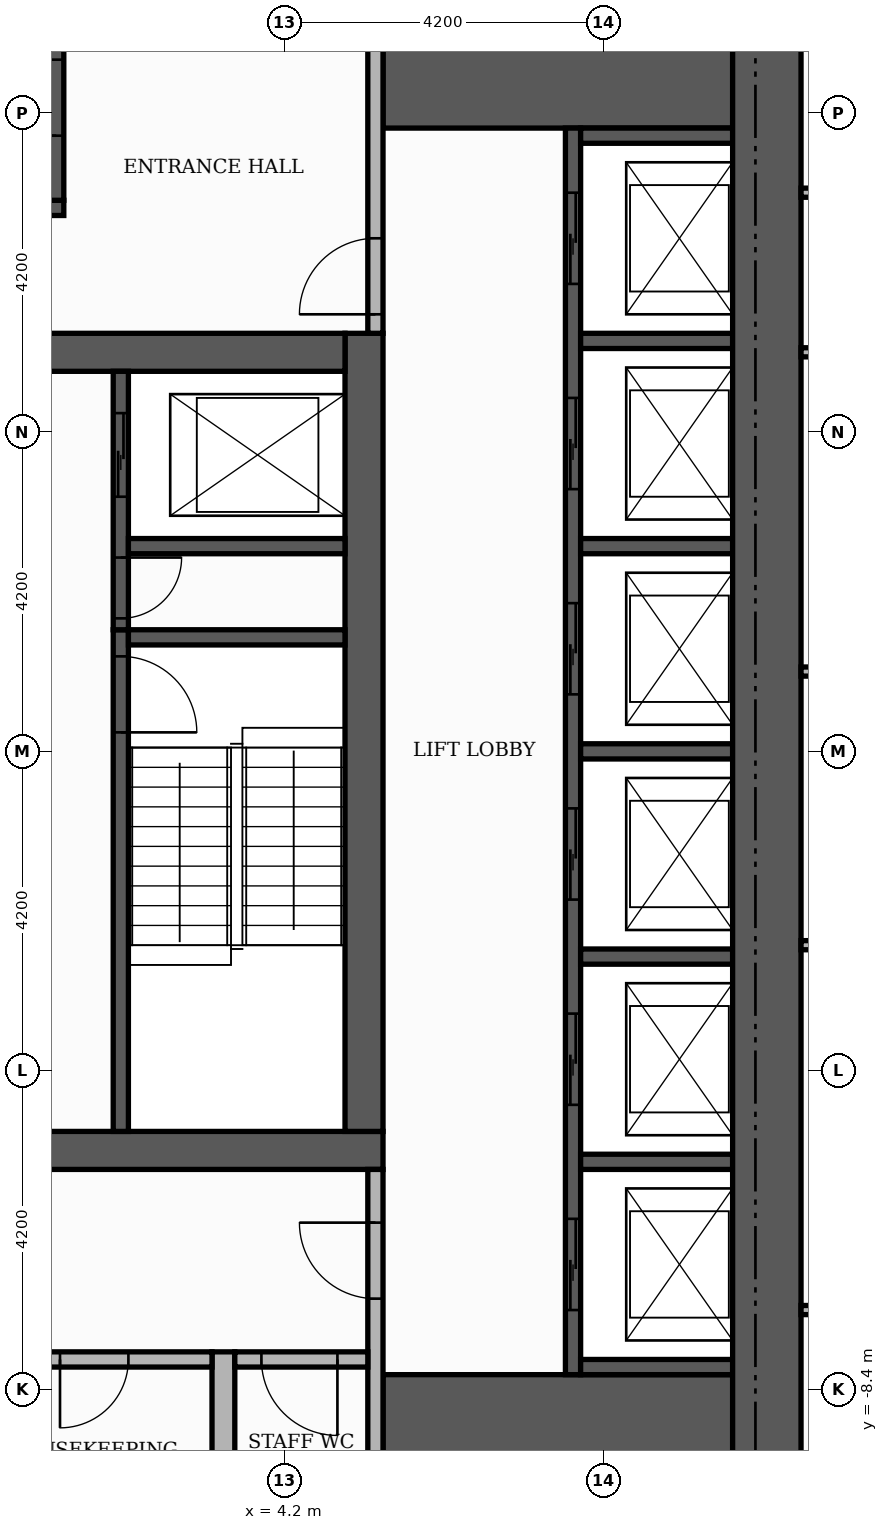
"""IFC4 building model, lengths in metres.
Left out: names, types, materials, properties, quantities, classifications, styles, units other than length and angle.
Written with IfcOpenShell. Run it as: python <this file> out.ifc"""

import sys

from ifc_helpers import new_model, si_unit, direction, frame, frame_2d, origin, place, context, subcontext, project, spatial, rectangle, extrude, element, fill, save


model = new_model("IFC4")
c1 = context("Model", 3, precision=1e-05, world=origin(), true_north=direction((0.0, 1.0)))
c2 = subcontext(c1, "Body", "Model", "MODEL_VIEW")
j1 = project(units=[si_unit("LENGTHUNIT", "METRE"), si_unit("PLANEANGLEUNIT", "RADIAN")], contexts=[c1])
p1 = place(None, origin())
s1 = spatial("IfcSite", under=j1, at=p1, CompositionType="ELEMENT")
p2 = place(p1, origin())
s2 = spatial("IfcBuilding", under=s1, at=p2, CompositionType="ELEMENT")
p3 = place(p2, frame((0.0, 0.0, 264.0)))
s3 = spatial("IfcBuildingStorey", under=s2, at=p3, CompositionType="ELEMENT", Elevation=264.0)
p4 = place(p3, frame((-5.5, -5.25, 0.0), z_axis=(0.0, 0.0, 1.0), x_axis=(1.0, 0.0, 0.0)))
e1 = element("IfcWall", 1, at=p4, inside=s3, PredefinedType="SHEAR", context=c2, shape_type="SweptSolid", body=[
    extrude(rectangle(XDim=11.0, YDim=0.5, at=frame_2d((5.5, 0.0))), origin(), (0.0, 0.0, 1.0), 3.48),
])
p5 = place(p4, frame((4.9, 0.0, 0.0)))
e2 = element("IfcOpeningElement", 2, at=p5, cuts=e1, PredefinedType="OPENING", context=c2, shape_type="SweptSolid", body=[
    extrude(rectangle(XDim=1.2, YDim=2.1, at=frame_2d((0.6, 1.05))), frame((0.0, 0.26, 0.0), z_axis=(0.0, -1.0, 0.0), x_axis=(1.0, 0.0, 0.0)), (0.0, 0.0, 1.0), 0.52),
])
p6 = place(p3, frame((5.25, -5.0, 0.0), z_axis=(0.0, 0.0, 1.0), x_axis=(0.0, 1.0, 0.0)))
e3 = element("IfcWall", 3, at=p6, inside=s3, PredefinedType="SHEAR", context=c2, shape_type="SweptSolid", body=[
    extrude(rectangle(XDim=10.5, YDim=0.5, at=frame_2d((5.25, 0.0))), origin(), (0.0, 0.0, 1.0), 3.48),
])
p7 = place(p3, frame((-5.0, 5.25, 0.0), z_axis=(0.0, 0.0, 1.0), x_axis=(1.0, 0.0, 0.0)))
e4 = element("IfcWall", 4, at=p7, inside=s3, PredefinedType="SHEAR", context=c2, shape_type="SweptSolid", body=[
    extrude(rectangle(XDim=10.0, YDim=0.5, at=frame_2d((5.0, 0.0))), origin(), (0.0, 0.0, 1.0), 3.48),
])
p8 = place(p7, frame((4.4, 0.0, 0.0)))
e5 = element("IfcOpeningElement", 5, at=p8, cuts=e4, PredefinedType="OPENING", context=c2, shape_type="SweptSolid", body=[
    extrude(rectangle(XDim=1.2, YDim=2.1, at=frame_2d((0.6, 1.05))), frame((0.0, 0.26, 0.0), z_axis=(0.0, -1.0, 0.0), x_axis=(1.0, 0.0, 0.0)), (0.0, 0.0, 1.0), 0.52),
])
for number, where, z_axis, x_axis in (
    (6, (5.5, -9.15, 0.0), (0.0, 0.0, 1.0), (1.0, 0.0, 0.0)),
    (7, (5.5, 9.15, 0.0), (0.0, 0.0, 1.0), (1.0, 0.0, 0.0)),
):
    element("IfcWall", number, at=place(p3, frame(where, z_axis=z_axis, x_axis=x_axis)), inside=s3, PredefinedType="SHEAR", context=c2, shape_type="SweptSolid", body=[
        extrude(rectangle(XDim=4.6, YDim=1.9, at=frame_2d((2.3, 0.0))), origin(), (0.0, 0.0, 1.0), 3.48),
    ])
p9 = place(p3, frame((2.05, -5.0, 0.0), z_axis=(0.0, 0.0, 1.0), x_axis=(0.0, 1.0, 0.0)))
e8 = element("IfcWall", 8, at=p9, inside=s3, PredefinedType="SHEAR", context=c2, shape_type="SweptSolid", body=[
    extrude(rectangle(XDim=6.6, YDim=0.2, at=frame_2d((3.3, 0.0))), origin(), (0.0, 0.0, 1.0), 3.48),
])
p10 = place(p9, frame((5.25, 0.0, 0.0)))
e9 = element("IfcOpeningElement", 9, at=p10, cuts=e8, PredefinedType="OPENING", context=c2, shape_type="SweptSolid", body=[
    extrude(rectangle(XDim=1.0, YDim=2.1, at=frame_2d((0.5, 1.05))), frame((0.0, 0.11, 0.0), z_axis=(0.0, -1.0, 0.0), x_axis=(1.0, 0.0, 0.0)), (0.0, 0.0, 1.0), 0.22),
])
p11 = place(p3, frame((2.15, 1.5, 0.0), z_axis=(0.0, 0.0, 1.0), x_axis=(1.0, 0.0, 0.0)))
e10 = element("IfcWall", 10, at=p11, inside=s3, PredefinedType="SHEAR", context=c2, shape_type="SweptSolid", body=[
    extrude(rectangle(XDim=2.85, YDim=0.2, at=frame_2d((1.425, 0.0))), origin(), (0.0, 0.0, 1.0), 3.48),
])
p12 = place(p3, frame((-5.5, 7.15, 0.0), z_axis=(0.0, 0.0, 1.0), x_axis=(1.0, 0.0, 0.0)))
e11 = element("IfcWall", 11, at=p12, inside=s3, PredefinedType="SHEAR", context=c2, shape_type="SweptSolid", body=[
    extrude(rectangle(XDim=6.8, YDim=0.2, at=frame_2d((3.4, 0.0))), origin(), (0.0, 0.0, 1.0), 3.48),
])
p13 = place(p3, frame((1.2, 7.25, 0.0), z_axis=(0.0, 0.0, 1.0), x_axis=(0.0, 1.0, 0.0)))
e12 = element("IfcWall", 12, at=p13, inside=s3, PredefinedType="SHEAR", context=c2, shape_type="SweptSolid", body=[
    extrude(rectangle(XDim=2.85, YDim=0.2, at=frame_2d((1.425, 0.0))), origin(), (0.0, 0.0, 1.0), 3.48),
])
p14 = place(p13, frame((0.85, 0.0, 0.0)))
e13 = element("IfcOpeningElement", 13, at=p14, cuts=e12, PredefinedType="OPENING", context=c2, shape_type="SweptSolid", body=[
    extrude(rectangle(XDim=1.0, YDim=2.1, at=frame_2d((0.5, 1.05))), frame((0.0, 0.11, 0.0), z_axis=(0.0, -1.0, 0.0), x_axis=(1.0, 0.0, 0.0)), (0.0, 0.0, 1.0), 0.22),
])
p15 = place(p3, frame((8.0, -8.2, 0.0), z_axis=(0.0, 0.0, 1.0), x_axis=(0.0, 1.0, 0.0)))
e14 = element("IfcWall", 14, at=p15, inside=s3, PredefinedType="SHEAR", context=c2, shape_type="SweptSolid", body=[
    extrude(rectangle(XDim=16.4, YDim=0.2, at=frame_2d((8.2, 0.0))), origin(), (0.0, 0.0, 1.0), 3.48),
])
p16 = place(p15, frame((0.85, 0.0, 0.0)))
e15 = element("IfcOpeningElement", 15, at=p16, cuts=e14, PredefinedType="OPENING", context=c2, shape_type="SweptSolid", body=[
    extrude(rectangle(XDim=1.2, YDim=2.1, at=frame_2d((0.6, 1.05))), frame((0.0, 0.11, 0.0), z_axis=(0.0, -1.0, 0.0), x_axis=(1.0, 0.0, 0.0)), (0.0, 0.0, 1.0), 0.22),
])
p17 = place(p15, frame((3.55, 0.0, 0.0)))
e16 = element("IfcOpeningElement", 16, at=p17, cuts=e14, PredefinedType="OPENING", context=c2, shape_type="SweptSolid", body=[
    extrude(rectangle(XDim=1.2, YDim=2.1, at=frame_2d((0.6, 1.05))), frame((0.0, 0.11, 0.0), z_axis=(0.0, -1.0, 0.0), x_axis=(1.0, 0.0, 0.0)), (0.0, 0.0, 1.0), 0.22),
])
p18 = place(p15, frame((6.25, 0.0, 0.0)))
e17 = element("IfcOpeningElement", 17, at=p18, cuts=e14, PredefinedType="OPENING", context=c2, shape_type="SweptSolid", body=[
    extrude(rectangle(XDim=1.2, YDim=2.1, at=frame_2d((0.6, 1.05))), frame((0.0, 0.11, 0.0), z_axis=(0.0, -1.0, 0.0), x_axis=(1.0, 0.0, 0.0)), (0.0, 0.0, 1.0), 0.22),
])
p19 = place(p15, frame((8.95, 0.0, 0.0)))
e18 = element("IfcOpeningElement", 18, at=p19, cuts=e14, PredefinedType="OPENING", context=c2, shape_type="SweptSolid", body=[
    extrude(rectangle(XDim=1.2, YDim=2.1, at=frame_2d((0.6, 1.05))), frame((0.0, 0.11, 0.0), z_axis=(0.0, -1.0, 0.0), x_axis=(1.0, 0.0, 0.0)), (0.0, 0.0, 1.0), 0.22),
])
p20 = place(p15, frame((11.65, 0.0, 0.0)))
e19 = element("IfcOpeningElement", 19, at=p20, cuts=e14, PredefinedType="OPENING", context=c2, shape_type="SweptSolid", body=[
    extrude(rectangle(XDim=1.2, YDim=2.1, at=frame_2d((0.6, 1.05))), frame((0.0, 0.11, 0.0), z_axis=(0.0, -1.0, 0.0), x_axis=(1.0, 0.0, 0.0)), (0.0, 0.0, 1.0), 0.22),
])
p21 = place(p15, frame((14.35, 0.0, 0.0)))
e20 = element("IfcOpeningElement", 20, at=p21, cuts=e14, PredefinedType="OPENING", context=c2, shape_type="SweptSolid", body=[
    extrude(rectangle(XDim=1.2, YDim=2.1, at=frame_2d((0.6, 1.05))), frame((0.0, 0.11, 0.0), z_axis=(0.0, -1.0, 0.0), x_axis=(1.0, 0.0, 0.0)), (0.0, 0.0, 1.0), 0.22),
])
for number, where, z_axis, x_axis in (
    (21, (8.1, -8.1, 0.0), (0.0, 0.0, 1.0), (1.0, 0.0, 0.0)),
    (22, (8.1, -5.4, 0.0), (0.0, 0.0, 1.0), (1.0, 0.0, 0.0)),
    (23, (8.1, -2.7, 0.0), (0.0, 0.0, 1.0), (1.0, 0.0, 0.0)),
    (24, (8.1, 0.0, 0.0), (0.0, 0.0, 1.0), (1.0, 0.0, 0.0)),
):
    element("IfcWall", number, at=place(p3, frame(where, z_axis=z_axis, x_axis=x_axis)), inside=s3, PredefinedType="SHEAR", context=c2, shape_type="SweptSolid", body=[
        extrude(rectangle(XDim=2.0, YDim=0.2, at=frame_2d((1.0, 0.0))), origin(), (0.0, 0.0, 1.0), 3.48),
    ])
p22 = place(p3, frame((2.05, 1.6, 0.0), z_axis=(0.0, 0.0, 1.0), x_axis=(0.0, 1.0, 0.0)))
e25 = element("IfcWall", 25, at=p22, inside=s3, PredefinedType="SHEAR", context=c2, shape_type="SweptSolid", body=[
    extrude(rectangle(XDim=3.4, YDim=0.2, at=frame_2d((1.7, 0.0))), origin(), (0.0, 0.0, 1.0), 3.48),
])
p23 = place(p22, frame((1.75, 0.0, 0.0)))
e26 = element("IfcOpeningElement", 26, at=p23, cuts=e25, PredefinedType="OPENING", context=c2, shape_type="SweptSolid", body=[
    extrude(rectangle(XDim=1.1, YDim=2.1, at=frame_2d((0.55, 1.05))), frame((0.0, 0.11, 0.0), z_axis=(0.0, -1.0, 0.0), x_axis=(1.0, 0.0, 0.0)), (0.0, 0.0, 1.0), 0.22),
])
p24 = place(p22, frame((0.15, 0.0, 0.0)))
e27 = element("IfcOpeningElement", 27, at=p24, cuts=e25, PredefinedType="OPENING", context=c2, shape_type="SweptSolid", body=[
    extrude(rectangle(XDim=0.8, YDim=2.1, at=frame_2d((0.4, 1.05))), frame((0.0, 0.11, 0.0), z_axis=(0.0, -1.0, 0.0), x_axis=(1.0, 0.0, 0.0)), (0.0, 0.0, 1.0), 0.22),
])
p25 = place(p3, frame((2.15, 2.7, 0.0), z_axis=(0.0, 0.0, 1.0), x_axis=(1.0, 0.0, 0.0)))
e28 = element("IfcWall", 28, at=p25, inside=s3, PredefinedType="SHEAR", context=c2, shape_type="SweptSolid", body=[
    extrude(rectangle(XDim=2.85, YDim=0.2, at=frame_2d((1.425, 0.0))), origin(), (0.0, 0.0, 1.0), 3.48),
])
for number, where, z_axis, x_axis in (
    (29, (8.1, 2.7, 0.0), (0.0, 0.0, 1.0), (1.0, 0.0, 0.0)),
    (30, (8.1, 5.4, 0.0), (0.0, 0.0, 1.0), (1.0, 0.0, 0.0)),
    (31, (8.1, 8.1, 0.0), (0.0, 0.0, 1.0), (1.0, 0.0, 0.0)),
):
    element("IfcWall", number, at=place(p3, frame(where, z_axis=z_axis, x_axis=x_axis)), inside=s3, PredefinedType="SHEAR", context=c2, shape_type="SweptSolid", body=[
        extrude(rectangle(XDim=2.0, YDim=0.2, at=frame_2d((1.0, 0.0))), origin(), (0.0, 0.0, 1.0), 3.48),
    ])
p26 = place(p3, frame((10.55, -10.1, 0.0), z_axis=(0.0, 0.0, 1.0), x_axis=(0.0, 1.0, 0.0)))
e32 = element("IfcWall", 32, at=p26, inside=s3, PredefinedType="SHEAR", context=c2, shape_type="SweptSolid", body=[
    extrude(rectangle(XDim=20.2, YDim=0.9, at=frame_2d((10.1, 0.0))), origin(), (0.0, 0.0, 1.0), 3.48),
])
p27 = place(p3, frame((3.4, -10.1, 0.0), z_axis=(0.0, 0.0, 1.0), x_axis=(0.0, 1.0, 0.0)))
e33 = element("IfcWall", 33, at=p27, inside=s3, PredefinedType="PARTITIONING", context=c2, shape_type="SweptSolid", body=[
    extrude(rectangle(XDim=2.2, YDim=0.3, at=frame_2d((1.1, 0.0))), origin(), (0.0, 0.0, 1.0), 3.48),
])
p28 = place(p3, frame((5.4, -10.1, 0.0), z_axis=(0.0, 0.0, 1.0), x_axis=(0.0, 1.0, 0.0)))
e34 = element("IfcWall", 34, at=p28, inside=s3, PredefinedType="PARTITIONING", context=c2, shape_type="SweptSolid", body=[
    extrude(rectangle(XDim=4.6, YDim=0.2, at=frame_2d((2.3, 0.0))), origin(), (0.0, 0.0, 1.0), 3.48),
])
p29 = place(p28, frame((2.9, 0.0, 0.0)))
e35 = element("IfcOpeningElement", 35, at=p29, cuts=e34, PredefinedType="OPENING", context=c2, shape_type="SweptSolid", body=[
    extrude(rectangle(XDim=1.0, YDim=2.1, at=frame_2d((0.5, 1.05))), frame((0.0, 0.11, 0.0), z_axis=(0.0, -1.0, 0.0), x_axis=(1.0, 0.0, 0.0)), (0.0, 0.0, 1.0), 0.22),
])
p30 = place(p3, frame((0.1, -8.0, 0.0), z_axis=(0.0, 0.0, 1.0), x_axis=(1.0, 0.0, 0.0)))
e36 = element("IfcWall", 36, at=p30, inside=s3, PredefinedType="PARTITIONING", context=c2, shape_type="SweptSolid", body=[
    extrude(rectangle(XDim=3.15, YDim=0.2, at=frame_2d((1.575, 0.0))), origin(), (0.0, 0.0, 1.0), 3.48),
])
p31 = place(p30, frame((1.15, 0.0, 0.0)))
e37 = element("IfcOpeningElement", 37, at=p31, cuts=e36, PredefinedType="OPENING", context=c2, shape_type="SweptSolid", body=[
    extrude(rectangle(XDim=0.9, YDim=2.1, at=frame_2d((0.45, 1.05))), frame((0.0, 0.11, 0.0), z_axis=(0.0, -1.0, 0.0), x_axis=(1.0, 0.0, 0.0)), (0.0, 0.0, 1.0), 0.22),
])
p32 = place(p3, frame((3.55, -8.0, 0.0), z_axis=(0.0, 0.0, 1.0), x_axis=(1.0, 0.0, 0.0)))
e38 = element("IfcWall", 38, at=p32, inside=s3, PredefinedType="PARTITIONING", context=c2, shape_type="SweptSolid", body=[
    extrude(rectangle(XDim=1.75, YDim=0.2, at=frame_2d((0.875, 0.0))), origin(), (0.0, 0.0, 1.0), 3.48),
])
p33 = place(p32, frame((0.35, 0.0, 0.0)))
e39 = element("IfcOpeningElement", 39, at=p33, cuts=e38, PredefinedType="OPENING", context=c2, shape_type="SweptSolid", body=[
    extrude(rectangle(XDim=1.0, YDim=2.1, at=frame_2d((0.5, 1.05))), frame((0.0, 0.11, 0.0), z_axis=(0.0, -1.0, 0.0), x_axis=(1.0, 0.0, 0.0)), (0.0, 0.0, 1.0), 0.22),
])
p34 = place(p3, frame((5.4, 5.5, 0.0), z_axis=(0.0, 0.0, 1.0), x_axis=(0.0, 1.0, 0.0)))
e40 = element("IfcWall", 40, at=p34, inside=s3, PredefinedType="PARTITIONING", context=c2, shape_type="SweptSolid", body=[
    extrude(rectangle(XDim=4.6, YDim=0.2, at=frame_2d((2.3, 0.0))), origin(), (0.0, 0.0, 1.0), 3.48),
])
p35 = place(p34, frame((0.25, 0.0, 0.0)))
e41 = element("IfcOpeningElement", 41, at=p35, cuts=e40, PredefinedType="OPENING", context=c2, shape_type="SweptSolid", body=[
    extrude(rectangle(XDim=1.0, YDim=2.1, at=frame_2d((0.5, 1.05))), frame((0.0, 0.11, 0.0), z_axis=(0.0, -1.0, 0.0), x_axis=(1.0, 0.0, 0.0)), (0.0, 0.0, 1.0), 0.22),
])
p36 = place(p3, frame((11.0, -7.35, 0.0), z_axis=(0.0, 0.0, 1.0), x_axis=(1.0, 0.0, 0.0)))
e42 = element("IfcWall", 42, at=p36, inside=s3, PredefinedType="PARTITIONING", context=c2, shape_type="SweptSolid", body=[
    extrude(rectangle(XDim=7.32, YDim=0.12, at=frame_2d((3.66, 0.0))), origin(), (0.0, 0.0, 1.0), 3.48),
])
p37 = place(p36, frame((3.21, 0.0, 0.0)))
e43 = element("IfcOpeningElement", 43, at=p37, cuts=e42, PredefinedType="OPENING", context=c2, shape_type="SweptSolid", body=[
    extrude(rectangle(XDim=0.9, YDim=2.1, at=frame_2d((0.45, 1.05))), frame((0.0, 0.07, 0.0), z_axis=(0.0, -1.0, 0.0), x_axis=(1.0, 0.0, 0.0)), (0.0, 0.0, 1.0), 0.14),
])
for number, where, z_axis, x_axis in (
    (44, (11.0, -2.55, 0.0), (0.0, 0.0, 1.0), (1.0, 0.0, 0.0)),
    (45, (11.0, 1.05, 0.0), (0.0, 0.0, 1.0), (1.0, 0.0, 0.0)),
    (46, (11.0, 5.25, 0.0), (0.0, 0.0, 1.0), (1.0, 0.0, 0.0)),
    (47, (11.0, 7.35, 0.0), (0.0, 0.0, 1.0), (1.0, 0.0, 0.0)),
):
    element("IfcWall", number, at=place(p3, frame(where, z_axis=z_axis, x_axis=x_axis)), inside=s3, PredefinedType="PARTITIONING", context=c2, shape_type="SweptSolid", body=[
        extrude(rectangle(XDim=7.32, YDim=0.12, at=frame_2d((3.66, 0.0))), origin(), (0.0, 0.0, 1.0), 3.48),
    ])
p38 = place(p16, origin())
e48 = element("IfcDoor", 48, at=p38, inside=s3, OperationType="SLIDING_TO_LEFT", PredefinedType="DOOR", context=c2, shape_type="SweptSolid", body=[
    extrude(rectangle(XDim=1.2, YDim=2.1, at=frame_2d((0.6, 1.05))), frame((0.0, 0.025, 0.0), z_axis=(0.0, -1.0, 0.0), x_axis=(1.0, 0.0, 0.0)), (0.0, 0.0, 1.0), 0.05),
])
fill(e15, e48)
p39 = place(p17, origin())
e49 = element("IfcDoor", 49, at=p39, inside=s3, OperationType="SLIDING_TO_LEFT", PredefinedType="DOOR", context=c2, shape_type="SweptSolid", body=[
    extrude(rectangle(XDim=1.2, YDim=2.1, at=frame_2d((0.6, 1.05))), frame((0.0, 0.025, 0.0), z_axis=(0.0, -1.0, 0.0), x_axis=(1.0, 0.0, 0.0)), (0.0, 0.0, 1.0), 0.05),
])
fill(e16, e49)
p40 = place(p18, origin())
e50 = element("IfcDoor", 50, at=p40, inside=s3, OperationType="SLIDING_TO_LEFT", PredefinedType="DOOR", context=c2, shape_type="SweptSolid", body=[
    extrude(rectangle(XDim=1.2, YDim=2.1, at=frame_2d((0.6, 1.05))), frame((0.0, 0.025, 0.0), z_axis=(0.0, -1.0, 0.0), x_axis=(1.0, 0.0, 0.0)), (0.0, 0.0, 1.0), 0.05),
])
fill(e17, e50)
p41 = place(p19, origin())
e51 = element("IfcDoor", 51, at=p41, inside=s3, OperationType="SLIDING_TO_LEFT", PredefinedType="DOOR", context=c2, shape_type="SweptSolid", body=[
    extrude(rectangle(XDim=1.2, YDim=2.1, at=frame_2d((0.6, 1.05))), frame((0.0, 0.025, 0.0), z_axis=(0.0, -1.0, 0.0), x_axis=(1.0, 0.0, 0.0)), (0.0, 0.0, 1.0), 0.05),
])
fill(e18, e51)
p42 = place(p20, origin())
e52 = element("IfcDoor", 52, at=p42, inside=s3, OperationType="SLIDING_TO_LEFT", PredefinedType="DOOR", context=c2, shape_type="SweptSolid", body=[
    extrude(rectangle(XDim=1.2, YDim=2.1, at=frame_2d((0.6, 1.05))), frame((0.0, 0.025, 0.0), z_axis=(0.0, -1.0, 0.0), x_axis=(1.0, 0.0, 0.0)), (0.0, 0.0, 1.0), 0.05),
])
fill(e19, e52)
p43 = place(p21, origin())
e53 = element("IfcDoor", 53, at=p43, inside=s3, OperationType="SLIDING_TO_LEFT", PredefinedType="DOOR", context=c2, shape_type="SweptSolid", body=[
    extrude(rectangle(XDim=1.2, YDim=2.1, at=frame_2d((0.6, 1.05))), frame((0.0, 0.025, 0.0), z_axis=(0.0, -1.0, 0.0), x_axis=(1.0, 0.0, 0.0)), (0.0, 0.0, 1.0), 0.05),
])
fill(e20, e53)
p44 = place(p23, origin())
e54 = element("IfcDoor", 54, at=p44, inside=s3, OperationType="SLIDING_TO_LEFT", PredefinedType="DOOR", context=c2, shape_type="SweptSolid", body=[
    extrude(rectangle(XDim=1.1, YDim=2.1, at=frame_2d((0.55, 1.05))), frame((0.0, 0.025, 0.0), z_axis=(0.0, -1.0, 0.0), x_axis=(1.0, 0.0, 0.0)), (0.0, 0.0, 1.0), 0.05),
])
fill(e26, e54)
p45 = place(p10, frame((1.0, 0.0, 0.0), z_axis=(0.0, 0.0, 1.0), x_axis=(-1.0, 0.0, 0.0)))
e55 = element("IfcDoor", 55, at=p45, inside=s3, OperationType="SINGLE_SWING_LEFT", PredefinedType="DOOR", context=c2, shape_type="SweptSolid", body=[
    extrude(rectangle(XDim=1.0, YDim=2.1, at=frame_2d((0.5, 1.05))), frame((0.0, 0.025, 0.0), z_axis=(0.0, -1.0, 0.0), x_axis=(1.0, 0.0, 0.0)), (0.0, 0.0, 1.0), 0.05),
])
fill(e9, e55)
p46 = place(p24, frame((0.8, 0.0, 0.0), z_axis=(0.0, 0.0, 1.0), x_axis=(-1.0, 0.0, 0.0)))
e56 = element("IfcDoor", 56, at=p46, inside=s3, OperationType="SINGLE_SWING_RIGHT", PredefinedType="DOOR", context=c2, shape_type="SweptSolid", body=[
    extrude(rectangle(XDim=0.8, YDim=2.1, at=frame_2d((0.4, 1.05))), frame((0.0, 0.025, 0.0), z_axis=(0.0, -1.0, 0.0), x_axis=(1.0, 0.0, 0.0)), (0.0, 0.0, 1.0), 0.05),
])
fill(e27, e56)
p47 = place(p14, origin())
e57 = element("IfcDoor", 57, at=p47, inside=s3, OperationType="SINGLE_SWING_LEFT", PredefinedType="DOOR", context=c2, shape_type="SweptSolid", body=[
    extrude(rectangle(XDim=1.0, YDim=2.1, at=frame_2d((0.5, 1.05))), frame((0.0, 0.025, 0.0), z_axis=(0.0, -1.0, 0.0), x_axis=(1.0, 0.0, 0.0)), (0.0, 0.0, 1.0), 0.05),
])
fill(e13, e57)
p48 = place(p35, origin())
e58 = element("IfcDoor", 58, at=p48, inside=s3, OperationType="SINGLE_SWING_LEFT", PredefinedType="DOOR", context=c2, shape_type="SweptSolid", body=[
    extrude(rectangle(XDim=1.0, YDim=2.1, at=frame_2d((0.5, 1.05))), frame((0.0, 0.025, 0.0), z_axis=(0.0, -1.0, 0.0), x_axis=(1.0, 0.0, 0.0)), (0.0, 0.0, 1.0), 0.05),
])
fill(e41, e58)
p49 = place(p29, origin())
e59 = element("IfcDoor", 59, at=p49, inside=s3, OperationType="SINGLE_SWING_RIGHT", PredefinedType="DOOR", context=c2, shape_type="SweptSolid", body=[
    extrude(rectangle(XDim=1.0, YDim=2.1, at=frame_2d((0.5, 1.05))), frame((0.0, 0.025, 0.0), z_axis=(0.0, -1.0, 0.0), x_axis=(1.0, 0.0, 0.0)), (0.0, 0.0, 1.0), 0.05),
])
fill(e35, e59)
p50 = place(p31, frame((0.9, 0.0, 0.0), z_axis=(0.0, 0.0, 1.0), x_axis=(-1.0, 0.0, 0.0)))
e60 = element("IfcDoor", 60, at=p50, inside=s3, OperationType="SINGLE_SWING_LEFT", PredefinedType="DOOR", context=c2, shape_type="SweptSolid", body=[
    extrude(rectangle(XDim=0.9, YDim=2.1, at=frame_2d((0.45, 1.05))), frame((0.0, 0.025, 0.0), z_axis=(0.0, -1.0, 0.0), x_axis=(1.0, 0.0, 0.0)), (0.0, 0.0, 1.0), 0.05),
])
fill(e37, e60)
p51 = place(p33, frame((1.0, 0.0, 0.0), z_axis=(0.0, 0.0, 1.0), x_axis=(-1.0, 0.0, 0.0)))
e61 = element("IfcDoor", 61, at=p51, inside=s3, OperationType="SINGLE_SWING_RIGHT", PredefinedType="DOOR", context=c2, shape_type="SweptSolid", body=[
    extrude(rectangle(XDim=1.0, YDim=2.1, at=frame_2d((0.5, 1.05))), frame((0.0, 0.025, 0.0), z_axis=(0.0, -1.0, 0.0), x_axis=(1.0, 0.0, 0.0)), (0.0, 0.0, 1.0), 0.05),
])
fill(e39, e61)
save(model, sys.argv[1])
